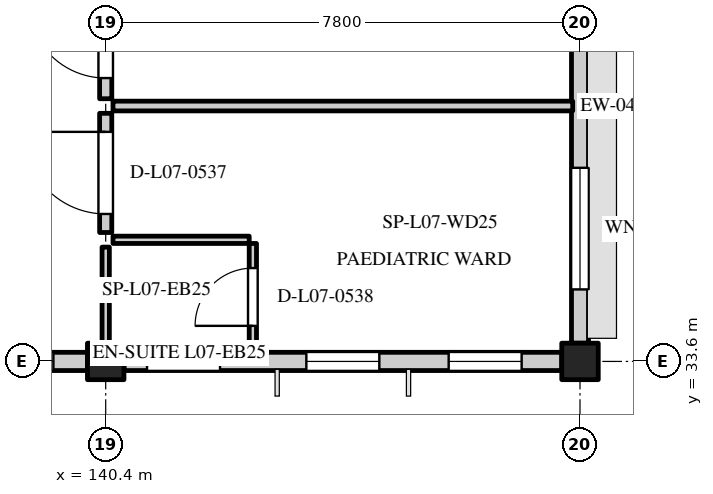
"""IFC4 building model, lengths in metres.
Left out: names, types, materials, properties, quantities, classifications, styles, units other than length and angle.
Written with IfcOpenShell. Run it as: python <this file> out.ifc"""

import sys

from ifc_helpers import new_model, si_unit, direction, frame, frame_2d, origin, origin_2d, place, context, subcontext, project, spatial, rectangle, extrude, element, fill, save


model = new_model("IFC4")
c1 = context("Model", 3, precision=1e-05, world=origin(), true_north=direction((0.0, 1.0)))
c2 = subcontext(c1, "Body", "Model", "MODEL_VIEW")
j1 = project(units=[si_unit("LENGTHUNIT", "METRE"), si_unit("PLANEANGLEUNIT", "RADIAN")], contexts=[c1])
p1 = place(None, origin())
s1 = spatial("IfcSite", under=j1, at=p1, CompositionType="ELEMENT")
p2 = place(p1, origin())
s2 = spatial("IfcBuilding", under=s1, at=p2, CompositionType="ELEMENT")
p3 = place(p2, frame((0.0, 0.0, 29.7)))
s3 = spatial("IfcBuildingStorey", under=s2, at=p3, CompositionType="ELEMENT", Elevation=29.7)
for number, where, z_axis, x_axis in (
    (1, (140.4, 33.6, 0.0), (0.0, 0.0, 1.0), (1.0, 0.0, 0.0)),
    (2, (148.2, 33.6, 0.0), (0.0, 0.0, 1.0), (1.0, 0.0, 0.0)),
):
    element("IfcColumn", number, at=place(p3, frame(where, z_axis=z_axis, x_axis=x_axis)), inside=s3, PredefinedType="COLUMN", context=c2, shape_type="SweptSolid", body=[
        extrude(rectangle(XDim=0.6, YDim=0.6, at=origin_2d()), origin(), (0.0, 0.0, 1.0), 4.2),
    ])
p4 = place(p3, frame((132.9, 33.6, 0.0), z_axis=(0.0, 0.0, 1.0), x_axis=(1.0, 0.0, 0.0)))
e3 = element("IfcWall", 3, at=p4, inside=s3, PredefinedType="STANDARD", context=c2, shape_type="SweptSolid", body=[
    extrude(rectangle(XDim=7.2, YDim=0.3, at=frame_2d((3.6, 0.0))), origin(), (0.0, 0.0, 1.0), 3.25),
])
p5 = place(p4, frame((0.48, 0.0, 0.8)))
e4 = element("IfcOpeningElement", 4, at=p5, cuts=e3, PredefinedType="OPENING", context=c2, shape_type="SweptSolid", body=[
    extrude(rectangle(XDim=1.0, YDim=1.45, at=frame_2d((0.5, 0.725))), frame((0.0, 0.162, 0.0), z_axis=(0.0, -1.0, 0.0), x_axis=(1.0, 0.0, 0.0)), (0.0, 0.0, 1.0), 0.324),
])
p6 = place(p4, frame((2.9, 0.0, 0.8)))
e5 = element("IfcOpeningElement", 5, at=p6, cuts=e3, PredefinedType="OPENING", context=c2, shape_type="SweptSolid", body=[
    extrude(rectangle(XDim=1.4, YDim=1.45, at=frame_2d((0.7, 0.725))), frame((0.0, 0.162, 0.0), z_axis=(0.0, -1.0, 0.0), x_axis=(1.0, 0.0, 0.0)), (0.0, 0.0, 1.0), 0.324),
])
p7 = place(p4, frame((5.24, 0.0, 0.8)))
e6 = element("IfcOpeningElement", 6, at=p7, cuts=e3, PredefinedType="OPENING", context=c2, shape_type="SweptSolid", body=[
    extrude(rectangle(XDim=1.4, YDim=1.45, at=frame_2d((0.7, 0.725))), frame((0.0, 0.162, 0.0), z_axis=(0.0, -1.0, 0.0), x_axis=(1.0, 0.0, 0.0)), (0.0, 0.0, 1.0), 0.324),
])
p8 = place(p3, frame((140.7, 33.6, 0.0), z_axis=(0.0, 0.0, 1.0), x_axis=(1.0, 0.0, 0.0)))
e7 = element("IfcWall", 7, at=p8, inside=s3, PredefinedType="STANDARD", context=c2, shape_type="SweptSolid", body=[
    extrude(rectangle(XDim=7.2, YDim=0.3, at=frame_2d((3.6, 0.0))), origin(), (0.0, 0.0, 1.0), 3.25),
])
p9 = place(p8, frame((0.38, 0.0, 0.8)))
e8 = element("IfcOpeningElement", 8, at=p9, cuts=e7, PredefinedType="OPENING", context=c2, shape_type="SweptSolid", body=[
    extrude(rectangle(XDim=1.2, YDim=1.55, at=frame_2d((0.6, 0.775))), frame((0.0, 0.162, 0.0), z_axis=(0.0, -1.0, 0.0), x_axis=(1.0, 0.0, 0.0)), (0.0, 0.0, 1.0), 0.324),
])
p10 = place(p8, frame((3.0, 0.0, 0.8)))
e9 = element("IfcOpeningElement", 9, at=p10, cuts=e7, PredefinedType="OPENING", context=c2, shape_type="SweptSolid", body=[
    extrude(rectangle(XDim=1.2, YDim=1.55, at=frame_2d((0.6, 0.775))), frame((0.0, 0.162, 0.0), z_axis=(0.0, -1.0, 0.0), x_axis=(1.0, 0.0, 0.0)), (0.0, 0.0, 1.0), 0.324),
])
p11 = place(p8, frame((5.34, 0.0, 0.8)))
e10 = element("IfcOpeningElement", 10, at=p11, cuts=e7, PredefinedType="OPENING", context=c2, shape_type="SweptSolid", body=[
    extrude(rectangle(XDim=1.2, YDim=1.55, at=frame_2d((0.6, 0.775))), frame((0.0, 0.162, 0.0), z_axis=(0.0, -1.0, 0.0), x_axis=(1.0, 0.0, 0.0)), (0.0, 0.0, 1.0), 0.324),
])
p12 = place(p3, frame((148.2, 33.9, 0.0), z_axis=(0.0, 0.0, 1.0), x_axis=(0.0, 1.0, 0.0)))
e11 = element("IfcWall", 11, at=p12, inside=s3, PredefinedType="STANDARD", context=c2, shape_type="SweptSolid", body=[
    extrude(rectangle(XDim=7.8, YDim=0.28, at=frame_2d((3.9, 0.0))), origin(), (0.0, 0.0, 1.0), 3.25),
])
p13 = place(p12, frame((0.884, 0.0, 0.8)))
e12 = element("IfcOpeningElement", 12, at=p13, cuts=e11, PredefinedType="OPENING", context=c2, shape_type="SweptSolid", body=[
    extrude(rectangle(XDim=2.0, YDim=1.45, at=frame_2d((1.0, 0.725))), frame((0.0, 0.152, 0.0), z_axis=(0.0, -1.0, 0.0), x_axis=(1.0, 0.0, 0.0)), (0.0, 0.0, 1.0), 0.304),
])
p14 = place(p12, frame((4.916, 0.0, 0.8)))
e13 = element("IfcOpeningElement", 13, at=p14, cuts=e11, PredefinedType="OPENING", context=c2, shape_type="SweptSolid", body=[
    extrude(rectangle(XDim=2.0, YDim=1.45, at=frame_2d((1.0, 0.725))), frame((0.0, 0.152, 0.0), z_axis=(0.0, -1.0, 0.0), x_axis=(1.0, 0.0, 0.0)), (0.0, 0.0, 1.0), 0.304),
])
p15 = place(p3, frame((140.52, 37.8, 0.0), z_axis=(0.0, 0.0, 1.0), x_axis=(1.0, 0.0, 0.0)))
e14 = element("IfcWall", 14, at=p15, inside=s3, PredefinedType="PARTITIONING", context=c2, shape_type="SweptSolid", body=[
    extrude(rectangle(XDim=7.56, YDim=0.16, at=frame_2d((3.78, 0.0))), origin(), (0.0, 0.0, 1.0), 3.88),
])
p16 = place(p3, frame((140.4, 35.72, 0.0), z_axis=(0.0, 0.0, 1.0), x_axis=(0.0, 1.0, 0.0)))
e15 = element("IfcWall", 15, at=p16, inside=s3, PredefinedType="STANDARD", context=c2, shape_type="SweptSolid", body=[
    extrude(rectangle(XDim=1.96, YDim=0.2, at=frame_2d((0.98, 0.0))), origin(), (0.0, 0.0, 1.0), 3.88),
])
p17 = place(p16, frame((0.305, 0.0, 0.0)))
e16 = element("IfcOpeningElement", 16, at=p17, cuts=e15, PredefinedType="OPENING", context=c2, shape_type="SweptSolid", body=[
    extrude(rectangle(XDim=1.35, YDim=2.15, at=frame_2d((0.675, 1.075))), frame((0.0, 0.112, 0.0), z_axis=(0.0, -1.0, 0.0), x_axis=(1.0, 0.0, 0.0)), (0.0, 0.0, 1.0), 0.224),
])
p18 = place(p3, frame((140.4, 33.72, 0.0), z_axis=(0.0, 0.0, 1.0), x_axis=(0.0, 1.0, 0.0)))
e17 = element("IfcWall", 17, at=p18, inside=s3, PredefinedType="PARTITIONING", context=c2, shape_type="SweptSolid", body=[
    extrude(rectangle(XDim=1.76, YDim=0.12, at=frame_2d((0.88, 0.0))), origin(), (0.0, 0.0, 1.0), 3.88),
])
p19 = place(p3, frame((140.52, 35.6, 0.0), z_axis=(0.0, 0.0, 1.0), x_axis=(1.0, 0.0, 0.0)))
e18 = element("IfcWall", 18, at=p19, inside=s3, PredefinedType="PARTITIONING", context=c2, shape_type="SweptSolid", body=[
    extrude(rectangle(XDim=2.24, YDim=0.12, at=frame_2d((1.12, 0.0))), origin(), (0.0, 0.0, 1.0), 3.88),
])
p20 = place(p3, frame((142.82, 33.78, 0.0), z_axis=(0.0, 0.0, 1.0), x_axis=(0.0, 1.0, 0.0)))
e19 = element("IfcWall", 19, at=p20, inside=s3, PredefinedType="PARTITIONING", context=c2, shape_type="SweptSolid", body=[
    extrude(rectangle(XDim=1.76, YDim=0.12, at=frame_2d((0.88, 0.0))), origin(), (0.0, 0.0, 1.0), 3.88),
])
p21 = place(p20, frame((0.405, 0.0, 0.0)))
e20 = element("IfcOpeningElement", 20, at=p21, cuts=e19, PredefinedType="OPENING", context=c2, shape_type="SweptSolid", body=[
    extrude(rectangle(XDim=0.95, YDim=2.1, at=frame_2d((0.475, 1.05))), frame((0.0, 0.072, 0.0), z_axis=(0.0, -1.0, 0.0), x_axis=(1.0, 0.0, 0.0)), (0.0, 0.0, 1.0), 0.144),
])
p22 = place(p3, frame((140.4, 37.92, 0.0), z_axis=(0.0, 0.0, 1.0), x_axis=(0.0, 1.0, 0.0)))
e21 = element("IfcWall", 21, at=p22, inside=s3, PredefinedType="STANDARD", context=c2, shape_type="SweptSolid", body=[
    extrude(rectangle(XDim=1.96, YDim=0.2, at=frame_2d((0.98, 0.0))), origin(), (0.0, 0.0, 1.0), 3.88),
])
p23 = place(p22, frame((0.34, 0.0, 0.0)))
e22 = element("IfcOpeningElement", 22, at=p23, cuts=e21, PredefinedType="OPENING", context=c2, shape_type="SweptSolid", body=[
    extrude(rectangle(XDim=1.28, YDim=2.15, at=frame_2d((0.64, 1.075))), frame((0.0, 0.112, 0.0), z_axis=(0.0, -1.0, 0.0), x_axis=(1.0, 0.0, 0.0)), (0.0, 0.0, 1.0), 0.224),
])
p24 = place(p7, origin())
e23 = element("IfcWindow", 23, at=p24, inside=s3, PartitioningType="SINGLE_PANEL", PredefinedType="WINDOW", context=c2, shape_type="SweptSolid", body=[
    extrude(rectangle(XDim=1.4, YDim=1.45, at=frame_2d((0.7, 0.725))), frame((0.0, 0.03, 0.0), z_axis=(0.0, -1.0, 0.0), x_axis=(1.0, 0.0, 0.0)), (0.0, 0.0, 1.0), 0.06),
])
fill(e6, e23)
p25 = place(p9, origin())
e24 = element("IfcWindow", 24, at=p25, inside=s3, PartitioningType="SINGLE_PANEL", PredefinedType="WINDOW", context=c2, shape_type="SweptSolid", body=[
    extrude(rectangle(XDim=1.2, YDim=1.55, at=frame_2d((0.6, 0.775))), frame((0.0, 0.03, 0.0), z_axis=(0.0, -1.0, 0.0), x_axis=(1.0, 0.0, 0.0)), (0.0, 0.0, 1.0), 0.06),
])
fill(e8, e24)
p26 = place(p10, origin())
e25 = element("IfcWindow", 25, at=p26, inside=s3, PartitioningType="SINGLE_PANEL", PredefinedType="WINDOW", context=c2, shape_type="SweptSolid", body=[
    extrude(rectangle(XDim=1.2, YDim=1.55, at=frame_2d((0.6, 0.775))), frame((0.0, 0.03, 0.0), z_axis=(0.0, -1.0, 0.0), x_axis=(1.0, 0.0, 0.0)), (0.0, 0.0, 1.0), 0.06),
])
fill(e9, e25)
p27 = place(p11, origin())
e26 = element("IfcWindow", 26, at=p27, inside=s3, PartitioningType="SINGLE_PANEL", PredefinedType="WINDOW", context=c2, shape_type="SweptSolid", body=[
    extrude(rectangle(XDim=1.2, YDim=1.55, at=frame_2d((0.6, 0.775))), frame((0.0, 0.03, 0.0), z_axis=(0.0, -1.0, 0.0), x_axis=(1.0, 0.0, 0.0)), (0.0, 0.0, 1.0), 0.06),
])
fill(e10, e26)
p28 = place(p13, origin())
e27 = element("IfcWindow", 27, at=p28, inside=s3, PartitioningType="DOUBLE_PANEL_VERTICAL", PredefinedType="WINDOW", context=c2, shape_type="SweptSolid", body=[
    extrude(rectangle(XDim=2.0, YDim=1.45, at=frame_2d((1.0, 0.725))), frame((0.0, 0.03, 0.0), z_axis=(0.0, -1.0, 0.0), x_axis=(1.0, 0.0, 0.0)), (0.0, 0.0, 1.0), 0.06),
])
fill(e12, e27)
p29 = place(p17, frame((1.35, 0.0, 0.0), z_axis=(0.0, 0.0, 1.0), x_axis=(-1.0, 0.0, 0.0)))
e28 = element("IfcDoor", 28, at=p29, inside=s3, OperationType="SINGLE_SWING_LEFT", PredefinedType="DOOR", context=c2, shape_type="SweptSolid", body=[
    extrude(rectangle(XDim=1.35, YDim=2.15, at=frame_2d((0.675, 1.075))), frame((0.0, 0.025, 0.0), z_axis=(0.0, -1.0, 0.0), x_axis=(1.0, 0.0, 0.0)), (0.0, 0.0, 1.0), 0.05),
])
fill(e16, e28)
p30 = place(p21, origin())
e29 = element("IfcDoor", 29, at=p30, inside=s3, OperationType="SINGLE_SWING_LEFT", PredefinedType="DOOR", context=c2, shape_type="SweptSolid", body=[
    extrude(rectangle(XDim=0.95, YDim=2.1, at=frame_2d((0.475, 1.05))), frame((0.0, 0.025, 0.0), z_axis=(0.0, -1.0, 0.0), x_axis=(1.0, 0.0, 0.0)), (0.0, 0.0, 1.0), 0.05),
])
fill(e20, e29)
p31 = place(p23, frame((1.28, 0.0, 0.0), z_axis=(0.0, 0.0, 1.0), x_axis=(-1.0, 0.0, 0.0)))
e30 = element("IfcDoor", 30, at=p31, inside=s3, OperationType="SINGLE_SWING_LEFT", PredefinedType="DOOR", context=c2, shape_type="SweptSolid", body=[
    extrude(rectangle(XDim=1.28, YDim=2.15, at=frame_2d((0.64, 1.075))), frame((0.0, 0.025, 0.0), z_axis=(0.0, -1.0, 0.0), x_axis=(1.0, 0.0, 0.0)), (0.0, 0.0, 1.0), 0.05),
])
fill(e22, e30)
save(model, sys.argv[1])
